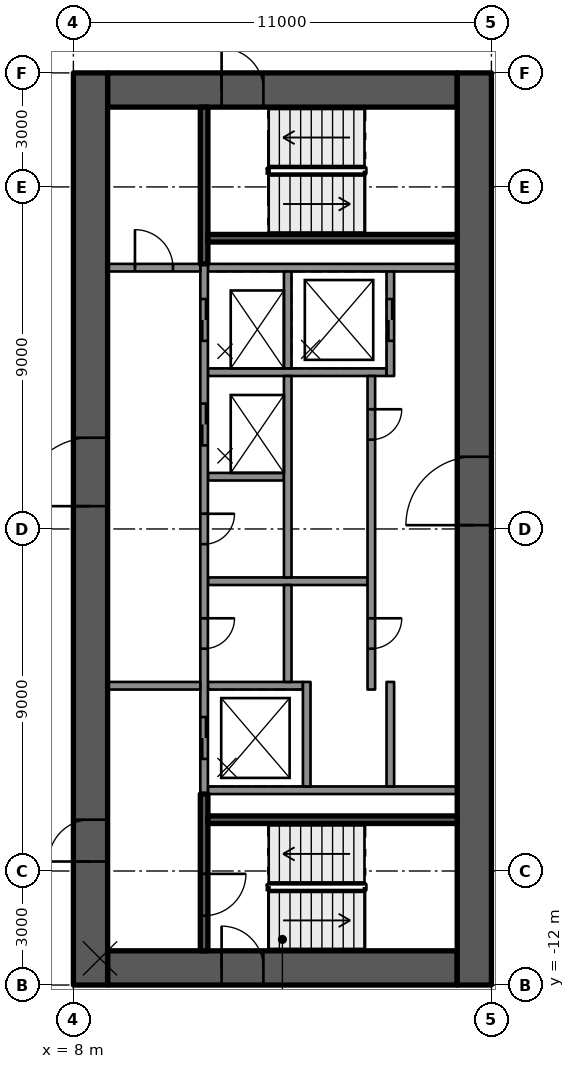
"""IFC4 building model, lengths in metres.
Left out: names, types, materials, properties, quantities, classifications, styles, units other than length and angle.
Written with IfcOpenShell. Run it as: python <this file> out.ifc"""

import sys

from ifc_helpers import new_model, si_unit, direction, frame, frame_2d, origin, place, context, subcontext, project, spatial, rectangle, extrude, element, fill, save


model = new_model("IFC4")
c1 = context("Model", 3, precision=1e-05, world=origin(), true_north=direction((0.0, 1.0)))
c2 = subcontext(c1, "Body", "Model", "MODEL_VIEW")
j1 = project(units=[si_unit("LENGTHUNIT", "METRE"), si_unit("PLANEANGLEUNIT", "RADIAN")], contexts=[c1])
p1 = place(None, origin())
s1 = spatial("IfcSite", under=j1, at=p1, CompositionType="ELEMENT")
p2 = place(p1, origin())
s2 = spatial("IfcBuilding", under=s1, at=p2, CompositionType="ELEMENT")
p3 = place(p2, frame((0.0, 0.0, 235.5)))
s3 = spatial("IfcBuildingStorey", under=s2, at=p3, CompositionType="ELEMENT", Elevation=235.5)
p4 = place(p3, frame((8.9, 11.55, 0.0), z_axis=(0.0, 0.0, 1.0), x_axis=(1.0, 0.0, 0.0)))
e1 = element("IfcWall", 1, at=p4, inside=s3, PredefinedType="SHEAR", context=c2, shape_type="SweptSolid", body=[
    extrude(rectangle(XDim=9.2, YDim=0.9, at=frame_2d((4.6, 0.0))), origin(), (0.0, 0.0, 1.0), 3.5),
])
p5 = place(p4, frame((3.0, 0.0, 0.0)))
e2 = element("IfcOpeningElement", 2, at=p5, cuts=e1, PredefinedType="OPENING", context=c2, shape_type="SweptSolid", body=[
    extrude(rectangle(XDim=1.1, YDim=2.1, at=frame_2d((0.55, 1.05))), frame((0.0, 0.46, 0.0), z_axis=(0.0, -1.0, 0.0), x_axis=(1.0, 0.0, 0.0)), (0.0, 0.0, 1.0), 0.92),
])
p6 = place(p3, frame((8.9, -11.55, 0.0), z_axis=(0.0, 0.0, 1.0), x_axis=(1.0, 0.0, 0.0)))
e3 = element("IfcWall", 3, at=p6, inside=s3, PredefinedType="SHEAR", context=c2, shape_type="SweptSolid", body=[
    extrude(rectangle(XDim=9.2, YDim=0.9, at=frame_2d((4.6, 0.0))), origin(), (0.0, 0.0, 1.0), 3.5),
])
p7 = place(p6, frame((3.0, 0.0, 0.0)))
e4 = element("IfcOpeningElement", 4, at=p7, cuts=e3, PredefinedType="OPENING", context=c2, shape_type="SweptSolid", body=[
    extrude(rectangle(XDim=1.1, YDim=2.1, at=frame_2d((0.55, 1.05))), frame((0.0, 0.46, 0.0), z_axis=(0.0, -1.0, 0.0), x_axis=(1.0, 0.0, 0.0)), (0.0, 0.0, 1.0), 0.92),
])
p8 = place(p3, frame((8.45, -12.0, 0.0), z_axis=(0.0, 0.0, 1.0), x_axis=(0.0, 1.0, 0.0)))
e5 = element("IfcWall", 5, at=p8, inside=s3, PredefinedType="SHEAR", context=c2, shape_type="SweptSolid", body=[
    extrude(rectangle(XDim=24.0, YDim=0.9, at=frame_2d((12.0, 0.0))), origin(), (0.0, 0.0, 1.0), 3.5),
])
p9 = place(p8, frame((12.6, 0.0, 0.0)))
e6 = element("IfcOpeningElement", 6, at=p9, cuts=e5, PredefinedType="OPENING", context=c2, shape_type="SweptSolid", body=[
    extrude(rectangle(XDim=1.8, YDim=2.1, at=frame_2d((0.9, 1.05))), frame((0.0, 0.46, 0.0), z_axis=(0.0, -1.0, 0.0), x_axis=(1.0, 0.0, 0.0)), (0.0, 0.0, 1.0), 0.92),
])
p10 = place(p8, frame((3.25, 0.0, 0.0)))
e7 = element("IfcOpeningElement", 7, at=p10, cuts=e5, PredefinedType="OPENING", context=c2, shape_type="SweptSolid", body=[
    extrude(rectangle(XDim=1.1, YDim=2.1, at=frame_2d((0.55, 1.05))), frame((0.0, 0.46, 0.0), z_axis=(0.0, -1.0, 0.0), x_axis=(1.0, 0.0, 0.0)), (0.0, 0.0, 1.0), 0.92),
])
p11 = place(p3, frame((18.55, -12.0, 0.0), z_axis=(0.0, 0.0, 1.0), x_axis=(0.0, 1.0, 0.0)))
e8 = element("IfcWall", 8, at=p11, inside=s3, PredefinedType="SHEAR", context=c2, shape_type="SweptSolid", body=[
    extrude(rectangle(XDim=24.0, YDim=0.9, at=frame_2d((12.0, 0.0))), origin(), (0.0, 0.0, 1.0), 3.5),
])
p12 = place(p11, frame((12.1, 0.0, 0.0)))
e9 = element("IfcOpeningElement", 9, at=p12, cuts=e8, PredefinedType="OPENING", context=c2, shape_type="SweptSolid", body=[
    extrude(rectangle(XDim=1.8, YDim=2.1, at=frame_2d((0.9, 1.05))), frame((0.0, 0.46, 0.0), z_axis=(0.0, -1.0, 0.0), x_axis=(1.0, 0.0, 0.0)), (0.0, 0.0, 1.0), 0.92),
])
for number, where, z_axis, x_axis in (
    (10, (11.54, -6.875, 0.0), (0.0, 0.0, 1.0), (1.0, 0.0, 0.0)),
    (11, (11.54, 6.875, 0.0), (0.0, 0.0, 1.0), (1.0, 0.0, 0.0)),
):
    element("IfcWall", number, at=place(p3, frame(where, z_axis=z_axis, x_axis=x_axis)), inside=s3, PredefinedType="SOLIDWALL", context=c2, shape_type="SweptSolid", body=[
        extrude(rectangle(XDim=6.56, YDim=0.2, at=frame_2d((3.28, 0.0))), origin(), (0.0, 0.0, 1.0), 3.09),
    ])
p13 = place(p3, frame((11.54, 4.125, 0.0), z_axis=(0.0, 0.0, 1.0), x_axis=(1.0, 0.0, 0.0)))
e12 = element("IfcWall", 12, at=p13, inside=s3, PredefinedType="SOLIDWALL", context=c2, shape_type="SweptSolid", body=[
    extrude(rectangle(XDim=4.7, YDim=0.2, at=frame_2d((2.35, 0.0))), origin(), (0.0, 0.0, 1.0), 3.09),
])
p14 = place(p3, frame((11.54, 1.375, 0.0), z_axis=(0.0, 0.0, 1.0), x_axis=(1.0, 0.0, 0.0)))
e13 = element("IfcWall", 13, at=p14, inside=s3, PredefinedType="SOLIDWALL", context=c2, shape_type="SweptSolid", body=[
    extrude(rectangle(XDim=2.0, YDim=0.2, at=frame_2d((1.0, 0.0))), origin(), (0.0, 0.0, 1.0), 3.09),
])
p15 = place(p3, frame((11.54, -1.375, 0.0), z_axis=(0.0, 0.0, 1.0), x_axis=(1.0, 0.0, 0.0)))
e14 = element("IfcWall", 14, at=p15, inside=s3, PredefinedType="SOLIDWALL", context=c2, shape_type="SweptSolid", body=[
    extrude(rectangle(XDim=4.2, YDim=0.2, at=frame_2d((2.1, 0.0))), origin(), (0.0, 0.0, 1.0), 3.09),
])
p16 = place(p3, frame((11.54, -4.125, 0.0), z_axis=(0.0, 0.0, 1.0), x_axis=(1.0, 0.0, 0.0)))
e15 = element("IfcWall", 15, at=p16, inside=s3, PredefinedType="SOLIDWALL", context=c2, shape_type="SweptSolid", body=[
    extrude(rectangle(XDim=2.5, YDim=0.2, at=frame_2d((1.25, 0.0))), origin(), (0.0, 0.0, 1.0), 3.09),
])
p17 = place(p3, frame((11.44, 6.975, 0.0), z_axis=(0.0, 0.0, 1.0), x_axis=(0.0, -1.0, 0.0)))
e16 = element("IfcWall", 16, at=p17, inside=s3, PredefinedType="SOLIDWALL", context=c2, shape_type="SweptSolid", body=[
    extrude(rectangle(XDim=13.95, YDim=0.2, at=frame_2d((6.975, 0.0))), origin(), (0.0, 0.0, 1.0), 3.09),
])
p18 = place(p17, frame((0.925, 0.0, 0.0)))
e17 = element("IfcOpeningElement", 17, at=p18, cuts=e16, PredefinedType="OPENING", context=c2, shape_type="SweptSolid", body=[
    extrude(rectangle(XDim=1.1, YDim=2.1, at=frame_2d((0.55, 1.05))), frame((0.0, 0.11, 0.0), z_axis=(0.0, -1.0, 0.0), x_axis=(1.0, 0.0, 0.0)), (0.0, 0.0, 1.0), 0.22),
])
p19 = place(p17, frame((3.675, 0.0, 0.0)))
e18 = element("IfcOpeningElement", 18, at=p19, cuts=e16, PredefinedType="OPENING", context=c2, shape_type="SweptSolid", body=[
    extrude(rectangle(XDim=1.1, YDim=2.1, at=frame_2d((0.55, 1.05))), frame((0.0, 0.11, 0.0), z_axis=(0.0, -1.0, 0.0), x_axis=(1.0, 0.0, 0.0)), (0.0, 0.0, 1.0), 0.22),
])
p20 = place(p17, frame((11.925, 0.0, 0.0)))
e19 = element("IfcOpeningElement", 19, at=p20, cuts=e16, PredefinedType="OPENING", context=c2, shape_type="SweptSolid", body=[
    extrude(rectangle(XDim=1.1, YDim=2.1, at=frame_2d((0.55, 1.05))), frame((0.0, 0.11, 0.0), z_axis=(0.0, -1.0, 0.0), x_axis=(1.0, 0.0, 0.0)), (0.0, 0.0, 1.0), 0.22),
])
p21 = place(p17, frame((6.575, 0.0, 0.0)))
e20 = element("IfcOpeningElement", 20, at=p21, cuts=e16, PredefinedType="OPENING", context=c2, shape_type="SweptSolid", body=[
    extrude(rectangle(XDim=0.8, YDim=2.1, at=frame_2d((0.4, 1.05))), frame((0.0, 0.11, 0.0), z_axis=(0.0, -1.0, 0.0), x_axis=(1.0, 0.0, 0.0)), (0.0, 0.0, 1.0), 0.22),
])
p22 = place(p17, frame((9.325, 0.0, 0.0)))
e21 = element("IfcOpeningElement", 21, at=p22, cuts=e16, PredefinedType="OPENING", context=c2, shape_type="SweptSolid", body=[
    extrude(rectangle(XDim=0.8, YDim=2.1, at=frame_2d((0.4, 1.05))), frame((0.0, 0.11, 0.0), z_axis=(0.0, -1.0, 0.0), x_axis=(1.0, 0.0, 0.0)), (0.0, 0.0, 1.0), 0.22),
])
p23 = place(p3, frame((13.64, 6.775, 0.0), z_axis=(0.0, 0.0, 1.0), x_axis=(0.0, -1.0, 0.0)))
e22 = element("IfcWall", 22, at=p23, inside=s3, PredefinedType="SOLIDWALL", context=c2, shape_type="SweptSolid", body=[
    extrude(rectangle(XDim=2.55, YDim=0.2, at=frame_2d((1.275, 0.0))), origin(), (0.0, 0.0, 1.0), 3.09),
])
p24 = place(p3, frame((13.64, 4.025, 0.0), z_axis=(0.0, 0.0, 1.0), x_axis=(0.0, -1.0, 0.0)))
e23 = element("IfcWall", 23, at=p24, inside=s3, PredefinedType="SOLIDWALL", context=c2, shape_type="SweptSolid", body=[
    extrude(rectangle(XDim=5.3, YDim=0.2, at=frame_2d((2.65, 0.0))), origin(), (0.0, 0.0, 1.0), 3.09),
])
p25 = place(p3, frame((13.64, -1.475, 0.0), z_axis=(0.0, 0.0, 1.0), x_axis=(0.0, -1.0, 0.0)))
e24 = element("IfcWall", 24, at=p25, inside=s3, PredefinedType="SOLIDWALL", context=c2, shape_type="SweptSolid", body=[
    extrude(rectangle(XDim=2.55, YDim=0.2, at=frame_2d((1.275, 0.0))), origin(), (0.0, 0.0, 1.0), 3.09),
])
p26 = place(p3, frame((14.14, -4.025, 0.0), z_axis=(0.0, 0.0, 1.0), x_axis=(0.0, -1.0, 0.0)))
e25 = element("IfcWall", 25, at=p26, inside=s3, PredefinedType="SOLIDWALL", context=c2, shape_type="SweptSolid", body=[
    extrude(rectangle(XDim=2.75, YDim=0.2, at=frame_2d((1.375, 0.0))), origin(), (0.0, 0.0, 1.0), 3.09),
])
p27 = place(p3, frame((16.34, 6.775, 0.0), z_axis=(0.0, 0.0, 1.0), x_axis=(0.0, -1.0, 0.0)))
e26 = element("IfcWall", 26, at=p27, inside=s3, PredefinedType="SOLIDWALL", context=c2, shape_type="SweptSolid", body=[
    extrude(rectangle(XDim=2.75, YDim=0.2, at=frame_2d((1.375, 0.0))), origin(), (0.0, 0.0, 1.0), 3.09),
])
p28 = place(p27, frame((0.725, 0.0, 0.0)))
e27 = element("IfcOpeningElement", 27, at=p28, cuts=e26, PredefinedType="OPENING", context=c2, shape_type="SweptSolid", body=[
    extrude(rectangle(XDim=1.1, YDim=2.1, at=frame_2d((0.55, 1.05))), frame((0.0, 0.11, 0.0), z_axis=(0.0, -1.0, 0.0), x_axis=(1.0, 0.0, 0.0)), (0.0, 0.0, 1.0), 0.22),
])
p29 = place(p3, frame((15.84, 4.025, 0.0), z_axis=(0.0, 0.0, 1.0), x_axis=(0.0, -1.0, 0.0)))
e28 = element("IfcWall", 28, at=p29, inside=s3, PredefinedType="SOLIDWALL", context=c2, shape_type="SweptSolid", body=[
    extrude(rectangle(XDim=8.25, YDim=0.2, at=frame_2d((4.125, 0.0))), origin(), (0.0, 0.0, 1.0), 3.09),
])
p30 = place(p29, frame((0.875, 0.0, 0.0)))
e29 = element("IfcOpeningElement", 29, at=p30, cuts=e28, PredefinedType="OPENING", context=c2, shape_type="SweptSolid", body=[
    extrude(rectangle(XDim=0.8, YDim=2.1, at=frame_2d((0.4, 1.05))), frame((0.0, 0.11, 0.0), z_axis=(0.0, -1.0, 0.0), x_axis=(1.0, 0.0, 0.0)), (0.0, 0.0, 1.0), 0.22),
])
p31 = place(p29, frame((6.375, 0.0, 0.0)))
e30 = element("IfcOpeningElement", 30, at=p31, cuts=e28, PredefinedType="OPENING", context=c2, shape_type="SweptSolid", body=[
    extrude(rectangle(XDim=0.8, YDim=2.1, at=frame_2d((0.4, 1.05))), frame((0.0, 0.11, 0.0), z_axis=(0.0, -1.0, 0.0), x_axis=(1.0, 0.0, 0.0)), (0.0, 0.0, 1.0), 0.22),
])
p32 = place(p3, frame((16.34, -4.025, 0.0), z_axis=(0.0, 0.0, 1.0), x_axis=(0.0, -1.0, 0.0)))
e31 = element("IfcWall", 31, at=p32, inside=s3, PredefinedType="SOLIDWALL", context=c2, shape_type="SweptSolid", body=[
    extrude(rectangle(XDim=2.75, YDim=0.2, at=frame_2d((1.375, 0.0))), origin(), (0.0, 0.0, 1.0), 3.09),
])
p33 = place(p3, frame((11.44, -6.975, 0.0), z_axis=(0.0, 0.0, 1.0), x_axis=(0.0, -1.0, 0.0)))
e32 = element("IfcWall", 32, at=p33, inside=s3, PredefinedType="SOLIDWALL", context=c2, shape_type="SweptSolid", body=[
    extrude(rectangle(XDim=4.125, YDim=0.2, at=frame_2d((2.062, 0.0))), origin(), (0.0, 0.0, 1.0), 3.09),
])
p34 = place(p33, frame((2.1, 0.0, 0.0)))
e33 = element("IfcOpeningElement", 33, at=p34, cuts=e32, PredefinedType="OPENING", context=c2, shape_type="SweptSolid", body=[
    extrude(rectangle(XDim=1.1, YDim=2.1, at=frame_2d((0.55, 1.05))), frame((0.0, 0.11, 0.0), z_axis=(0.0, -1.0, 0.0), x_axis=(1.0, 0.0, 0.0)), (0.0, 0.0, 1.0), 0.22),
])
p35 = place(p3, frame((11.54, -7.65, 0.0), z_axis=(0.0, 0.0, 1.0), x_axis=(1.0, 0.0, 0.0)))
e34 = element("IfcWall", 34, at=p35, inside=s3, PredefinedType="SOLIDWALL", context=c2, shape_type="SweptSolid", body=[
    extrude(rectangle(XDim=6.56, YDim=0.2, at=frame_2d((3.28, 0.0))), origin(), (0.0, 0.0, 1.0), 3.09),
])
p36 = place(p3, frame((11.44, 11.1, 0.0), z_axis=(0.0, 0.0, 1.0), x_axis=(0.0, -1.0, 0.0)))
e35 = element("IfcWall", 35, at=p36, inside=s3, PredefinedType="SOLIDWALL", context=c2, shape_type="SweptSolid", body=[
    extrude(rectangle(XDim=4.125, YDim=0.2, at=frame_2d((2.062, 0.0))), origin(), (0.0, 0.0, 1.0), 3.09),
])
p37 = place(p3, frame((11.54, 7.65, 0.0), z_axis=(0.0, 0.0, 1.0), x_axis=(1.0, 0.0, 0.0)))
e36 = element("IfcWall", 36, at=p37, inside=s3, PredefinedType="SOLIDWALL", context=c2, shape_type="SweptSolid", body=[
    extrude(rectangle(XDim=6.56, YDim=0.2, at=frame_2d((3.28, 0.0))), origin(), (0.0, 0.0, 1.0), 3.09),
])
p38 = place(p3, frame((8.9, -4.125, 0.0), z_axis=(0.0, 0.0, 1.0), x_axis=(1.0, 0.0, 0.0)))
e37 = element("IfcWall", 37, at=p38, inside=s3, PredefinedType="PARTITIONING", context=c2, shape_type="SweptSolid", body=[
    extrude(rectangle(XDim=2.44, YDim=0.2, at=frame_2d((1.22, 0.0))), origin(), (0.0, 0.0, 1.0), 3.09),
])
p39 = place(p3, frame((8.9, 6.875, 0.0), z_axis=(0.0, 0.0, 1.0), x_axis=(1.0, 0.0, 0.0)))
e38 = element("IfcWall", 38, at=p39, inside=s3, PredefinedType="PARTITIONING", context=c2, shape_type="SweptSolid", body=[
    extrude(rectangle(XDim=2.44, YDim=0.2, at=frame_2d((1.22, 0.0))), origin(), (0.0, 0.0, 1.0), 3.09),
])
p40 = place(p39, frame((0.72, 0.0, 0.0)))
e39 = element("IfcOpeningElement", 39, at=p40, cuts=e38, PredefinedType="OPENING", context=c2, shape_type="SweptSolid", body=[
    extrude(rectangle(XDim=1.0, YDim=2.1, at=frame_2d((0.5, 1.05))), frame((0.0, 0.11, 0.0), z_axis=(0.0, -1.0, 0.0), x_axis=(1.0, 0.0, 0.0)), (0.0, 0.0, 1.0), 0.22),
])
p41 = place(p18, origin())
e40 = element("IfcDoor", 40, at=p41, inside=s3, OperationType="DOUBLE_DOOR_SLIDING", PredefinedType="DOOR", context=c2, shape_type="SweptSolid", body=[
    extrude(rectangle(XDim=1.1, YDim=2.1, at=frame_2d((0.55, 1.05))), frame((0.0, 0.025, 0.0), z_axis=(0.0, -1.0, 0.0), x_axis=(1.0, 0.0, 0.0)), (0.0, 0.0, 1.0), 0.05),
])
fill(e17, e40)
p42 = place(p28, origin())
e41 = element("IfcDoor", 41, at=p42, inside=s3, OperationType="DOUBLE_DOOR_SLIDING", PredefinedType="DOOR", context=c2, shape_type="SweptSolid", body=[
    extrude(rectangle(XDim=1.1, YDim=2.1, at=frame_2d((0.55, 1.05))), frame((0.0, 0.025, 0.0), z_axis=(0.0, -1.0, 0.0), x_axis=(1.0, 0.0, 0.0)), (0.0, 0.0, 1.0), 0.05),
])
fill(e27, e41)
p43 = place(p19, origin())
e42 = element("IfcDoor", 42, at=p43, inside=s3, OperationType="DOUBLE_DOOR_SLIDING", PredefinedType="DOOR", context=c2, shape_type="SweptSolid", body=[
    extrude(rectangle(XDim=1.1, YDim=2.1, at=frame_2d((0.55, 1.05))), frame((0.0, 0.025, 0.0), z_axis=(0.0, -1.0, 0.0), x_axis=(1.0, 0.0, 0.0)), (0.0, 0.0, 1.0), 0.05),
])
fill(e18, e42)
p44 = place(p20, origin())
e43 = element("IfcDoor", 43, at=p44, inside=s3, OperationType="DOUBLE_DOOR_SLIDING", PredefinedType="DOOR", context=c2, shape_type="SweptSolid", body=[
    extrude(rectangle(XDim=1.1, YDim=2.1, at=frame_2d((0.55, 1.05))), frame((0.0, 0.025, 0.0), z_axis=(0.0, -1.0, 0.0), x_axis=(1.0, 0.0, 0.0)), (0.0, 0.0, 1.0), 0.05),
])
fill(e19, e43)
p45 = place(p30, origin())
e44 = element("IfcDoor", 44, at=p45, inside=s3, OperationType="SINGLE_SWING_LEFT", PredefinedType="DOOR", context=c2, shape_type="SweptSolid", body=[
    extrude(rectangle(XDim=0.8, YDim=2.1, at=frame_2d((0.4, 1.05))), frame((0.0, 0.025, 0.0), z_axis=(0.0, -1.0, 0.0), x_axis=(1.0, 0.0, 0.0)), (0.0, 0.0, 1.0), 0.05),
])
fill(e29, e44)
p46 = place(p21, origin())
e45 = element("IfcDoor", 45, at=p46, inside=s3, OperationType="SINGLE_SWING_LEFT", PredefinedType="DOOR", context=c2, shape_type="SweptSolid", body=[
    extrude(rectangle(XDim=0.8, YDim=2.1, at=frame_2d((0.4, 1.05))), frame((0.0, 0.025, 0.0), z_axis=(0.0, -1.0, 0.0), x_axis=(1.0, 0.0, 0.0)), (0.0, 0.0, 1.0), 0.05),
])
fill(e20, e45)
p47 = place(p22, origin())
e46 = element("IfcDoor", 46, at=p47, inside=s3, OperationType="SINGLE_SWING_LEFT", PredefinedType="DOOR", context=c2, shape_type="SweptSolid", body=[
    extrude(rectangle(XDim=0.8, YDim=2.1, at=frame_2d((0.4, 1.05))), frame((0.0, 0.025, 0.0), z_axis=(0.0, -1.0, 0.0), x_axis=(1.0, 0.0, 0.0)), (0.0, 0.0, 1.0), 0.05),
])
fill(e21, e46)
p48 = place(p31, origin())
e47 = element("IfcDoor", 47, at=p48, inside=s3, OperationType="SINGLE_SWING_LEFT", PredefinedType="DOOR", context=c2, shape_type="SweptSolid", body=[
    extrude(rectangle(XDim=0.8, YDim=2.1, at=frame_2d((0.4, 1.05))), frame((0.0, 0.025, 0.0), z_axis=(0.0, -1.0, 0.0), x_axis=(1.0, 0.0, 0.0)), (0.0, 0.0, 1.0), 0.05),
])
fill(e30, e47)
p49 = place(p9, origin())
e48 = element("IfcDoor", 48, at=p49, inside=s3, OperationType="SINGLE_SWING_RIGHT", PredefinedType="DOOR", context=c2, shape_type="SweptSolid", body=[
    extrude(rectangle(XDim=1.8, YDim=2.1, at=frame_2d((0.9, 1.05))), frame((0.0, 0.025, 0.0), z_axis=(0.0, -1.0, 0.0), x_axis=(1.0, 0.0, 0.0)), (0.0, 0.0, 1.0), 0.05),
])
fill(e6, e48)
p50 = place(p12, origin())
e49 = element("IfcDoor", 49, at=p50, inside=s3, OperationType="SINGLE_SWING_RIGHT", PredefinedType="DOOR", context=c2, shape_type="SweptSolid", body=[
    extrude(rectangle(XDim=1.8, YDim=2.1, at=frame_2d((0.9, 1.05))), frame((0.0, 0.025, 0.0), z_axis=(0.0, -1.0, 0.0), x_axis=(1.0, 0.0, 0.0)), (0.0, 0.0, 1.0), 0.05),
])
fill(e9, e49)
p51 = place(p10, origin())
e50 = element("IfcDoor", 50, at=p51, inside=s3, OperationType="SINGLE_SWING_LEFT", PredefinedType="DOOR", context=c2, shape_type="SweptSolid", body=[
    extrude(rectangle(XDim=1.1, YDim=2.1, at=frame_2d((0.55, 1.05))), frame((0.0, 0.025, 0.0), z_axis=(0.0, -1.0, 0.0), x_axis=(1.0, 0.0, 0.0)), (0.0, 0.0, 1.0), 0.05),
])
fill(e7, e50)
p52 = place(p7, origin())
e51 = element("IfcDoor", 51, at=p52, inside=s3, OperationType="SINGLE_SWING_LEFT", PredefinedType="DOOR", context=c2, shape_type="SweptSolid", body=[
    extrude(rectangle(XDim=1.1, YDim=2.1, at=frame_2d((0.55, 1.05))), frame((0.0, 0.025, 0.0), z_axis=(0.0, -1.0, 0.0), x_axis=(1.0, 0.0, 0.0)), (0.0, 0.0, 1.0), 0.05),
])
fill(e4, e51)
p53 = place(p5, origin())
e52 = element("IfcDoor", 52, at=p53, inside=s3, OperationType="SINGLE_SWING_LEFT", PredefinedType="DOOR", context=c2, shape_type="SweptSolid", body=[
    extrude(rectangle(XDim=1.1, YDim=2.1, at=frame_2d((0.55, 1.05))), frame((0.0, 0.025, 0.0), z_axis=(0.0, -1.0, 0.0), x_axis=(1.0, 0.0, 0.0)), (0.0, 0.0, 1.0), 0.05),
])
fill(e2, e52)
p54 = place(p34, origin())
e53 = element("IfcDoor", 53, at=p54, inside=s3, OperationType="SINGLE_SWING_RIGHT", PredefinedType="DOOR", context=c2, shape_type="SweptSolid", body=[
    extrude(rectangle(XDim=1.1, YDim=2.1, at=frame_2d((0.55, 1.05))), frame((0.0, 0.025, 0.0), z_axis=(0.0, -1.0, 0.0), x_axis=(1.0, 0.0, 0.0)), (0.0, 0.0, 1.0), 0.05),
])
fill(e33, e53)
p55 = place(p40, origin())
e54 = element("IfcDoor", 54, at=p55, inside=s3, OperationType="SINGLE_SWING_RIGHT", PredefinedType="DOOR", context=c2, shape_type="SweptSolid", body=[
    extrude(rectangle(XDim=1.0, YDim=2.1, at=frame_2d((0.5, 1.05))), frame((0.0, 0.025, 0.0), z_axis=(0.0, -1.0, 0.0), x_axis=(1.0, 0.0, 0.0)), (0.0, 0.0, 1.0), 0.05),
])
fill(e39, e54)
save(model, sys.argv[1])
